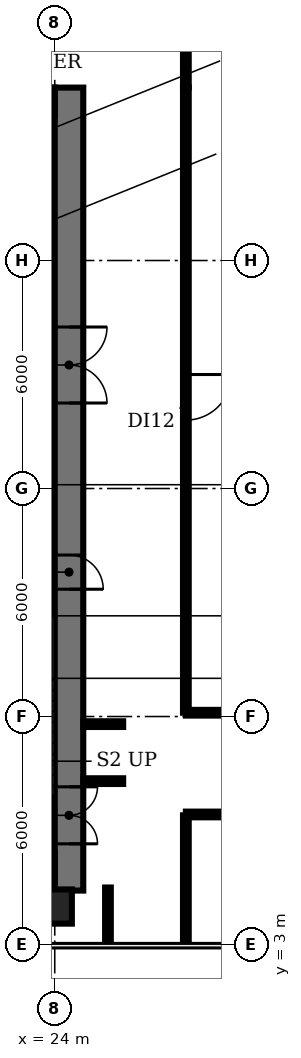
"""IFC4 building model, lengths in metres.
Left out: names, types, materials, properties, quantities, classifications, styles, units other than length and angle.
Written with IfcOpenShell. Run it as: python <this file> out.ifc"""

import sys

from ifc_helpers import new_model, si_unit, direction, frame, frame_2d, origin, origin_2d, place, context, subcontext, project, spatial, rectangle, extrude, element, fill, save


model = new_model("IFC4")
c1 = context("Model", 3, precision=1e-05, world=origin(), true_north=direction((0.0, 1.0)))
c2 = subcontext(c1, "Body", "Model", "MODEL_VIEW")
j1 = project(units=[si_unit("LENGTHUNIT", "METRE"), si_unit("PLANEANGLEUNIT", "RADIAN")], contexts=[c1])
p1 = place(None, origin())
s1 = spatial("IfcSite", under=j1, at=p1, CompositionType="ELEMENT")
p2 = place(p1, origin())
s2 = spatial("IfcBuilding", under=s1, at=p2, CompositionType="ELEMENT")
p3 = place(p2, frame((0.0, 0.0, 92.0)))
s3 = spatial("IfcBuildingStorey", under=s2, at=p3, CompositionType="ELEMENT", Elevation=92.0)
p4 = place(p3, frame((24.0, 4.0, 0.0), z_axis=(0.0, 0.0, 1.0), x_axis=(1.0, 0.0, 0.0)))
e1 = element("IfcColumn", 1, at=p4, inside=s3, PredefinedType="COLUMN", context=c2, shape_type="SweptSolid", body=[
    extrude(rectangle(XDim=0.9, YDim=0.9, at=origin_2d()), origin(), (0.0, 0.0, 1.0), 3.85),
])
p5 = place(p3, frame((20.85, 11.825, 0.0), z_axis=(0.0, 0.0, 1.0), x_axis=(1.0, 0.0, 0.0)))
e2 = element("IfcWall", 2, at=p5, inside=s3, PredefinedType="SHEAR", context=c2, shape_type="SweptSolid", body=[
    extrude(rectangle(XDim=3.15, YDim=0.25, at=frame_2d((1.575, 0.0))), origin(), (0.0, 0.0, 1.0), 3.85),
])
p6 = place(p3, frame((16.6, 13.7, 0.0), z_axis=(0.0, 0.0, 1.0), x_axis=(1.0, 0.0, 0.0)))
e3 = element("IfcWall", 3, at=p6, inside=s3, PredefinedType="PARTITIONING", context=c2, shape_type="SweptSolid", body=[
    extrude(rectangle(XDim=7.4, YDim=0.225, at=frame_2d((3.7, 0.0))), origin(), (0.0, 0.0, 1.0), 3.85),
])
p7 = place(p3, frame((9.4, 16.5, 0.0), z_axis=(0.0, 0.0, 1.0), x_axis=(1.0, 0.0, 0.0)))
e4 = element("IfcWall", 4, at=p7, inside=s3, PredefinedType="PARTITIONING", context=c2, shape_type="SweptSolid", body=[
    extrude(rectangle(XDim=14.6, YDim=0.225, at=frame_2d((7.3, 0.0))), origin(), (0.0, 0.0, 1.0), 3.85),
])
p8 = place(p7, frame((0.75, 0.0, 0.0)))
e5 = element("IfcOpeningElement", 5, at=p8, cuts=e4, PredefinedType="OPENING", context=c2, shape_type="SweptSolid", body=[
    extrude(rectangle(XDim=1.1, YDim=2.1, at=frame_2d((0.55, 1.05))), frame((0.0, 0.123, 0.0), z_axis=(0.0, -1.0, 0.0), x_axis=(1.0, 0.0, 0.0)), (0.0, 0.0, 1.0), 0.245),
])
p9 = place(p7, frame((3.55, 0.0, 0.0)))
e6 = element("IfcOpeningElement", 6, at=p9, cuts=e4, PredefinedType="OPENING", context=c2, shape_type="SweptSolid", body=[
    extrude(rectangle(XDim=1.1, YDim=2.1, at=frame_2d((0.55, 1.05))), frame((0.0, 0.123, 0.0), z_axis=(0.0, -1.0, 0.0), x_axis=(1.0, 0.0, 0.0)), (0.0, 0.0, 1.0), 0.245),
])
p10 = place(p7, frame((6.35, 0.0, 0.0)))
e7 = element("IfcOpeningElement", 7, at=p10, cuts=e4, PredefinedType="OPENING", context=c2, shape_type="SweptSolid", body=[
    extrude(rectangle(XDim=1.1, YDim=2.1, at=frame_2d((0.55, 1.05))), frame((0.0, 0.123, 0.0), z_axis=(0.0, -1.0, 0.0), x_axis=(1.0, 0.0, 0.0)), (0.0, 0.0, 1.0), 0.245),
])
p11 = place(p7, frame((9.15, 0.0, 0.0)))
e8 = element("IfcOpeningElement", 8, at=p11, cuts=e4, PredefinedType="OPENING", context=c2, shape_type="SweptSolid", body=[
    extrude(rectangle(XDim=1.1, YDim=2.1, at=frame_2d((0.55, 1.05))), frame((0.0, 0.123, 0.0), z_axis=(0.0, -1.0, 0.0), x_axis=(1.0, 0.0, 0.0)), (0.0, 0.0, 1.0), 0.245),
])
p12 = place(p7, frame((12.4, 0.0, 0.0)))
e9 = element("IfcOpeningElement", 9, at=p12, cuts=e4, PredefinedType="OPENING", context=c2, shape_type="SweptSolid", body=[
    extrude(rectangle(XDim=1.0, YDim=2.1, at=frame_2d((0.5, 1.05))), frame((0.0, 0.123, 0.0), z_axis=(0.0, -1.0, 0.0), x_axis=(1.0, 0.0, 0.0)), (0.0, 0.0, 1.0), 0.245),
])
p13 = place(p3, frame((24.0, 20.0, 0.0), z_axis=(0.0, 0.0, 1.0), x_axis=(-1.0, 0.0, 0.0)))
e10 = element("IfcWall", 10, at=p13, inside=s3, PredefinedType="PARTITIONING", context=c2, shape_type="SweptSolid", body=[
    extrude(rectangle(XDim=14.6, YDim=0.225, at=frame_2d((7.3, 0.0))), origin(), (0.0, 0.0, 1.0), 3.85),
])
p14 = place(p13, frame((12.5, 0.0, 0.0)))
e11 = element("IfcOpeningElement", 11, at=p14, cuts=e10, PredefinedType="OPENING", context=c2, shape_type="SweptSolid", body=[
    extrude(rectangle(XDim=1.0, YDim=2.1, at=frame_2d((0.5, 1.05))), frame((0.0, 0.123, 0.0), z_axis=(0.0, -1.0, 0.0), x_axis=(1.0, 0.0, 0.0)), (0.0, 0.0, 1.0), 0.245),
])
p15 = place(p13, frame((8.825, 0.0, 0.0)))
e12 = element("IfcOpeningElement", 12, at=p15, cuts=e10, PredefinedType="OPENING", context=c2, shape_type="SweptSolid", body=[
    extrude(rectangle(XDim=1.0, YDim=2.1, at=frame_2d((0.5, 1.05))), frame((0.0, 0.123, 0.0), z_axis=(0.0, -1.0, 0.0), x_axis=(1.0, 0.0, 0.0)), (0.0, 0.0, 1.0), 0.245),
])
p16 = place(p13, frame((4.925, 0.0, 0.0)))
e13 = element("IfcOpeningElement", 13, at=p16, cuts=e10, PredefinedType="OPENING", context=c2, shape_type="SweptSolid", body=[
    extrude(rectangle(XDim=1.0, YDim=2.1, at=frame_2d((0.5, 1.05))), frame((0.0, 0.123, 0.0), z_axis=(0.0, -1.0, 0.0), x_axis=(1.0, 0.0, 0.0)), (0.0, 0.0, 1.0), 0.245),
])
p17 = place(p13, frame((1.2, 0.0, 0.0)))
e14 = element("IfcOpeningElement", 14, at=p17, cuts=e10, PredefinedType="OPENING", context=c2, shape_type="SweptSolid", body=[
    extrude(rectangle(XDim=1.0, YDim=2.1, at=frame_2d((0.5, 1.05))), frame((0.0, 0.123, 0.0), z_axis=(0.0, -1.0, 0.0), x_axis=(1.0, 0.0, 0.0)), (0.0, 0.0, 1.0), 0.245),
])
p18 = place(p3, frame((9.4, 22.8, 0.0), z_axis=(0.0, 0.0, 1.0), x_axis=(1.0, 0.0, 0.0)))
e15 = element("IfcWall", 15, at=p18, inside=s3, PredefinedType="PARTITIONING", context=c2, shape_type="SweptSolid", body=[
    extrude(rectangle(XDim=14.6, YDim=0.225, at=frame_2d((7.3, 0.0))), origin(), (0.0, 0.0, 1.0), 3.85),
])
p19 = place(p3, frame((24.375, 25.55, 0.0), z_axis=(0.0, 0.0, 1.0), x_axis=(0.0, -1.0, 0.0)))
e16 = element("IfcWall", 16, at=p19, inside=s3, PredefinedType="SHEAR", context=c2, shape_type="SweptSolid", body=[
    extrude(rectangle(XDim=21.13, YDim=0.75, at=frame_2d((10.565, 0.0))), origin(), (0.0, 0.0, 1.0), 3.85),
])
p20 = place(p19, frame((18.4, 0.0, 0.0)))
e17 = element("IfcOpeningElement", 17, at=p20, cuts=e16, PredefinedType="OPENING", context=c2, shape_type="SweptSolid", body=[
    extrude(rectangle(XDim=1.5, YDim=2.1, at=frame_2d((0.75, 1.05))), frame((0.0, 0.385, 0.0), z_axis=(0.0, -1.0, 0.0), x_axis=(1.0, 0.0, 0.0)), (0.0, 0.0, 1.0), 0.77),
])
p21 = place(p19, frame((12.3, 0.0, 0.0)))
e18 = element("IfcOpeningElement", 18, at=p21, cuts=e16, PredefinedType="OPENING", context=c2, shape_type="SweptSolid", body=[
    extrude(rectangle(XDim=0.9, YDim=2.1, at=frame_2d((0.45, 1.05))), frame((0.0, 0.385, 0.0), z_axis=(0.0, -1.0, 0.0), x_axis=(1.0, 0.0, 0.0)), (0.0, 0.0, 1.0), 0.77),
])
p22 = place(p19, frame((6.3, 0.0, 0.0)))
e19 = element("IfcOpeningElement", 19, at=p22, cuts=e16, PredefinedType="OPENING", context=c2, shape_type="SweptSolid", body=[
    extrude(rectangle(XDim=2.0, YDim=2.1, at=frame_2d((1.0, 1.05))), frame((0.0, 0.385, 0.0), z_axis=(0.0, -1.0, 0.0), x_axis=(1.0, 0.0, 0.0)), (0.0, 0.0, 1.0), 0.77),
])
p23 = place(p3, frame((24.0, 5.025, 0.0), z_axis=(0.0, 0.0, 1.0), x_axis=(-1.0, 0.0, 0.0)))
e20 = element("IfcWall", 20, at=p23, inside=s3, PredefinedType="SHEAR", context=c2, shape_type="SweptSolid", body=[
    extrude(rectangle(XDim=18.0, YDim=0.75, at=frame_2d((9.0, 0.0))), origin(), (0.0, 0.0, 1.0), 3.85),
])
p24 = place(p23, frame((0.825, 0.0, 0.0)))
e21 = element("IfcOpeningElement", 21, at=p24, cuts=e20, PredefinedType="OPENING", context=c2, shape_type="SweptSolid", body=[
    extrude(rectangle(XDim=1.5, YDim=2.1, at=frame_2d((0.75, 1.05))), frame((0.0, 0.385, 0.0), z_axis=(0.0, -1.0, 0.0), x_axis=(1.0, 0.0, 0.0)), (0.0, 0.0, 1.0), 0.77),
])
p25 = place(p23, frame((15.675, 0.0, 0.0)))
e22 = element("IfcOpeningElement", 22, at=p25, cuts=e20, PredefinedType="OPENING", context=c2, shape_type="SweptSolid", body=[
    extrude(rectangle(XDim=1.5, YDim=2.1, at=frame_2d((0.75, 1.05))), frame((0.0, 0.385, 0.0), z_axis=(0.0, -1.0, 0.0), x_axis=(1.0, 0.0, 0.0)), (0.0, 0.0, 1.0), 0.77),
])
p26 = place(p23, frame((13.0, 0.0, 0.0)))
e23 = element("IfcOpeningElement", 23, at=p26, cuts=e20, PredefinedType="OPENING", context=c2, shape_type="SweptSolid", body=[
    extrude(rectangle(XDim=1.2, YDim=2.1, at=frame_2d((0.6, 1.05))), frame((0.0, 0.385, 0.0), z_axis=(0.0, -1.0, 0.0), x_axis=(1.0, 0.0, 0.0)), (0.0, 0.0, 1.0), 0.77),
])
p27 = place(p23, frame((4.35, 0.0, 0.0)))
e24 = element("IfcOpeningElement", 24, at=p27, cuts=e20, PredefinedType="OPENING", context=c2, shape_type="SweptSolid", body=[
    extrude(rectangle(XDim=1.0, YDim=2.1, at=frame_2d((0.5, 1.05))), frame((0.0, 0.385, 0.0), z_axis=(0.0, -1.0, 0.0), x_axis=(1.0, 0.0, 0.0)), (0.0, 0.0, 1.0), 0.77),
])
p28 = place(p3, frame((6.0, 25.175, 0.0), z_axis=(0.0, 0.0, 1.0), x_axis=(1.0, 0.0, 0.0)))
e25 = element("IfcWall", 25, at=p28, inside=s3, PredefinedType="SHEAR", context=c2, shape_type="SweptSolid", body=[
    extrude(rectangle(XDim=18.0, YDim=0.75, at=frame_2d((9.0, 0.0))), origin(), (0.0, 0.0, 1.0), 3.85),
])
for number, where, z_axis, x_axis in (
    (26, (24.75, 7.3, 0.0), (0.0, 0.0, 1.0), (1.0, 0.0, 0.0)),
    (27, (24.75, 8.8, 0.0), (0.0, 0.0, 1.0), (1.0, 0.0, 0.0)),
):
    element("IfcWall", number, at=place(p3, frame(where, z_axis=z_axis, x_axis=x_axis)), inside=s3, PredefinedType="PARTITIONING", context=c2, shape_type="SweptSolid", body=[
        extrude(rectangle(XDim=1.05, YDim=0.15, at=frame_2d((0.525, 0.0))), origin(), (0.0, 0.0, 1.0), 2.83),
    ])
p29 = place(p3, frame((25.4, 3.02, 0.0), z_axis=(0.0, 0.0, 1.0), x_axis=(0.0, 1.0, 0.0)))
e28 = element("IfcWall", 28, at=p29, inside=s3, PredefinedType="PARTITIONING", context=c2, shape_type="SweptSolid", body=[
    extrude(rectangle(XDim=1.48, YDim=0.15, at=frame_2d((0.74, 0.0))), origin(), (0.0, 0.0, 1.0), 2.83),
])
p30 = place(p3, frame((27.45, 3.02, 0.0), z_axis=(0.0, 0.0, 1.0), x_axis=(0.0, 1.0, 0.0)))
e29 = element("IfcWall", 29, at=p30, inside=s3, PredefinedType="PARTITIONING", context=c2, shape_type="SweptSolid", body=[
    extrude(rectangle(XDim=3.38, YDim=0.15, at=frame_2d((1.69, 0.0))), origin(), (0.0, 0.0, 1.0), 2.83),
])
p31 = place(p3, frame((27.45, 9.1, 0.0), z_axis=(0.0, 0.0, 1.0), x_axis=(1.0, 0.0, 0.0)))
e30 = element("IfcWall", 30, at=p31, inside=s3, PredefinedType="PARTITIONING", context=c2, shape_type="SweptSolid", body=[
    extrude(rectangle(XDim=8.55, YDim=0.15, at=frame_2d((4.275, 0.0))), origin(), (0.0, 0.0, 1.0), 2.83),
])
p32 = place(p3, frame((27.45, 25.55, 0.0), z_axis=(0.0, 0.0, 1.0), x_axis=(0.0, -1.0, 0.0)))
e31 = element("IfcWall", 31, at=p32, inside=s3, PredefinedType="PARTITIONING", context=c2, shape_type="SweptSolid", body=[
    extrude(rectangle(XDim=16.45, YDim=0.15, at=frame_2d((8.225, 0.0))), origin(), (0.0, 0.0, 1.0), 2.83),
])
p33 = place(p32, frame((7.55, 0.0, 0.0)))
e32 = element("IfcOpeningElement", 32, at=p33, cuts=e31, PredefinedType="OPENING", context=c2, shape_type="SweptSolid", body=[
    extrude(rectangle(XDim=1.2, YDim=2.1, at=frame_2d((0.6, 1.05))), frame((0.0, 0.085, 0.0), z_axis=(0.0, -1.0, 0.0), x_axis=(1.0, 0.0, 0.0)), (0.0, 0.0, 1.0), 0.17),
])
p34 = place(p3, frame((27.45, 25.55, 0.0), z_axis=(0.0, 0.0, 1.0), x_axis=(0.0, 1.0, 0.0)))
e33 = element("IfcWall", 33, at=p34, inside=s3, PredefinedType="PARTITIONING", context=c2, shape_type="SweptSolid", body=[
    extrude(rectangle(XDim=3.9, YDim=0.15, at=frame_2d((1.95, 0.0))), origin(), (0.0, 0.0, 1.0), 2.83),
])
p35 = place(p3, frame((51.78, 6.423, 0.0), z_axis=(0.0, 0.0, 1.0), x_axis=(-1.0, 0.0, 0.0)))
e34 = element("IfcWall", 34, at=p35, inside=s3, PredefinedType="PARTITIONING", context=c2, shape_type="SweptSolid", body=[
    extrude(rectangle(XDim=24.33, YDim=0.15, at=frame_2d((12.165, 0.0))), origin(), (0.0, 0.0, 1.0), 2.83),
])
p36 = place(p35, frame((11.53, 0.0, 0.0)))
e35 = element("IfcOpeningElement", 35, at=p36, cuts=e34, PredefinedType="OPENING", context=c2, shape_type="SweptSolid", body=[
    extrude(rectangle(XDim=1.2, YDim=2.1, at=frame_2d((0.6, 1.05))), frame((0.0, 0.085, 0.0), z_axis=(0.0, -1.0, 0.0), x_axis=(1.0, 0.0, 0.0)), (0.0, 0.0, 1.0), 0.17),
])
p37 = place(p20, origin())
e36 = element("IfcDoor", 36, at=p37, inside=s3, OperationType="DOUBLE_DOOR_SINGLE_SWING", PredefinedType="DOOR", context=c2, shape_type="SweptSolid", body=[
    extrude(rectangle(XDim=1.5, YDim=2.1, at=frame_2d((0.75, 1.05))), frame((0.0, 0.025, 0.0), z_axis=(0.0, -1.0, 0.0), x_axis=(1.0, 0.0, 0.0)), (0.0, 0.0, 1.0), 0.05),
])
fill(e17, e36)
p38 = place(p21, origin())
e37 = element("IfcDoor", 37, at=p38, inside=s3, OperationType="SINGLE_SWING_RIGHT", PredefinedType="DOOR", context=c2, shape_type="SweptSolid", body=[
    extrude(rectangle(XDim=0.9, YDim=2.1, at=frame_2d((0.45, 1.05))), frame((0.0, -0.315, 0.0), z_axis=(0.0, -1.0, 0.0), x_axis=(1.0, 0.0, 0.0)), (0.0, 0.0, 1.0), 0.05),
])
fill(e18, e37)
p39 = place(p22, origin())
e38 = element("IfcDoor", 38, at=p39, inside=s3, OperationType="DOUBLE_DOOR_SINGLE_SWING", PredefinedType="DOOR", context=c2, shape_type="SweptSolid", body=[
    extrude(rectangle(XDim=2.0, YDim=2.1, at=frame_2d((1.0, 1.05))), frame((0.0, 0.025, 0.0), z_axis=(0.0, -1.0, 0.0), x_axis=(1.0, 0.0, 0.0)), (0.0, 0.0, 1.0), 0.05),
])
fill(e19, e38)
p40 = place(p33, origin())
e39 = element("IfcDoor", 39, at=p40, inside=s3, OperationType="SINGLE_SWING_LEFT", PredefinedType="DOOR", context=c2, shape_type="SweptSolid", body=[
    extrude(rectangle(XDim=1.2, YDim=2.1, at=frame_2d((0.6, 1.05))), frame((0.0, 0.025, 0.0), z_axis=(0.0, -1.0, 0.0), x_axis=(1.0, 0.0, 0.0)), (0.0, 0.0, 1.0), 0.05),
])
fill(e32, e39)
save(model, sys.argv[1])
